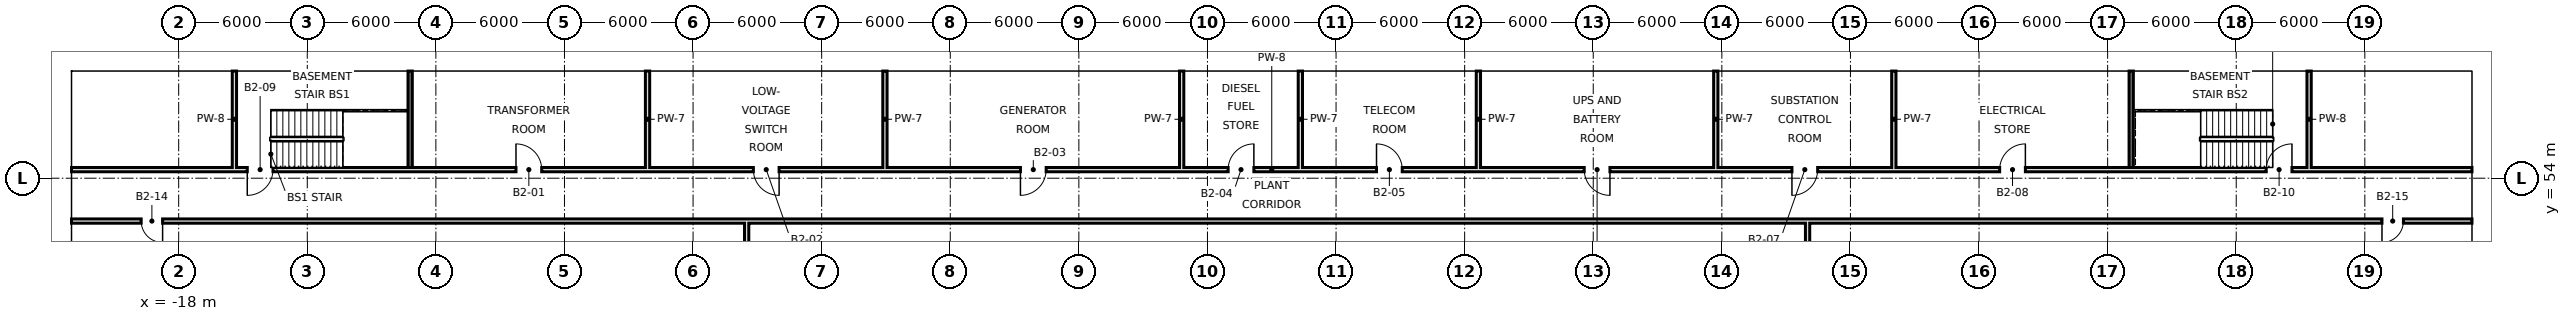
"""IFC4 building model, lengths in metres.
Left out: names, types, materials, properties, quantities, classifications, styles, units other than length and angle.
Written with IfcOpenShell. Run it as: python <this file> out.ifc"""

import sys

from ifc_helpers import new_model, si_unit, direction, frame, frame_2d, origin, place, context, subcontext, project, spatial, rectangle, extrude, element, fill, save


model = new_model("IFC4")
c1 = context("Model", 3, precision=1e-05, world=origin(), true_north=direction((0.0, 1.0)))
c2 = subcontext(c1, "Body", "Model", "MODEL_VIEW")
j1 = project(units=[si_unit("LENGTHUNIT", "METRE"), si_unit("PLANEANGLEUNIT", "RADIAN")], contexts=[c1])
p1 = place(None, origin())
s1 = spatial("IfcSite", under=j1, at=p1, CompositionType="ELEMENT")
p2 = place(p1, origin())
s2 = spatial("IfcBuilding", under=s1, at=p2, CompositionType="ELEMENT")
p3 = place(p2, frame((0.0, 0.0, -13.5)))
s3 = spatial("IfcBuildingStorey", under=s2, at=p3, CompositionType="ELEMENT", Elevation=-13.5)
for number, where, z_axis, x_axis in (
    (1, (-23.5, -12.0, -26.5), (0.0, 0.0, 1.0), (0.0, 1.0, 0.0)),
    (2, (89.5, -12.0, -26.5), (0.0, 0.0, 1.0), (0.0, 1.0, 0.0)),
):
    element("IfcWall", number, at=place(p3, frame(where, z_axis=z_axis, x_axis=x_axis)), inside=s3, PredefinedType="SOLIDWALL", context=c2, shape_type="SweptSolid", body=[
        extrude(rectangle(XDim=72.0, YDim=1.0, at=frame_2d((36.0, 0.0))), origin(), (0.0, 0.0, 1.0), 39.64),
    ])
p4 = place(p3, frame((-23.0, 59.5, -26.5), z_axis=(0.0, 0.0, 1.0), x_axis=(1.0, 0.0, 0.0)))
e3 = element("IfcWall", 3, at=p4, inside=s3, PredefinedType="SOLIDWALL", context=c2, shape_type="SweptSolid", body=[
    extrude(rectangle(XDim=112.0, YDim=1.0, at=frame_2d((56.0, 0.0))), origin(), (0.0, 0.0, 1.0), 39.64),
])
p5 = place(p2, frame((0.0, 0.0, -9.0)))
s4 = spatial("IfcBuildingStorey", under=s2, at=p5, CompositionType="ELEMENT", Elevation=-9.0)
for number, where, z_axis, x_axis in (
    (4, (-15.4, 54.5, 0.0), (0.0, 0.0, 1.0), (0.0, 1.0, 0.0)),
    (5, (-7.2, 54.5, 0.0), (0.0, 0.0, 1.0), (0.0, 1.0, 0.0)),
    (6, (3.876, 54.5, 0.0), (0.0, 0.0, 1.0), (0.0, 1.0, 0.0)),
):
    element("IfcWall", number, at=place(p5, frame(where, z_axis=z_axis, x_axis=x_axis)), inside=s4, PredefinedType="SOLIDWALL", context=c2, shape_type="SweptSolid", body=[
        extrude(rectangle(XDim=4.5, YDim=0.2, at=frame_2d((2.25, 0.0))), origin(), (0.0, 0.0, 1.0), 4.14),
    ])
p6 = place(p5, frame((8.5, 49.6, 0.0), z_axis=(0.0, 0.0, 1.0), x_axis=(0.0, 1.0, 0.0)))
e7 = element("IfcWall", 7, at=p6, inside=s4, PredefinedType="SOLIDWALL", context=c2, shape_type="SweptSolid", body=[
    extrude(rectangle(XDim=2.3, YDim=0.2, at=frame_2d((1.15, 0.0))), origin(), (0.0, 0.0, 1.0), 4.14),
])
for number, where, z_axis, x_axis in (
    (8, (14.952, 54.5, 0.0), (0.0, 0.0, 1.0), (0.0, 1.0, 0.0)),
    (9, (28.797, 54.5, 0.0), (0.0, 0.0, 1.0), (0.0, 1.0, 0.0)),
    (10, (34.334, 54.5, 0.0), (0.0, 0.0, 1.0), (0.0, 1.0, 0.0)),
    (11, (42.641, 54.5, 0.0), (0.0, 0.0, 1.0), (0.0, 1.0, 0.0)),
    (12, (53.717, 54.5, 0.0), (0.0, 0.0, 1.0), (0.0, 1.0, 0.0)),
):
    element("IfcWall", number, at=place(p5, frame(where, z_axis=z_axis, x_axis=x_axis)), inside=s4, PredefinedType="SOLIDWALL", context=c2, shape_type="SweptSolid", body=[
        extrude(rectangle(XDim=4.5, YDim=0.2, at=frame_2d((2.25, 0.0))), origin(), (0.0, 0.0, 1.0), 4.14),
    ])
p7 = place(p5, frame((58.0, -11.0, 0.0), z_axis=(0.0, 0.0, 1.0), x_axis=(0.0, 1.0, 0.0)))
e13 = element("IfcWall", 13, at=p7, inside=s4, PredefinedType="SOLIDWALL", context=c2, shape_type="SweptSolid", body=[
    extrude(rectangle(XDim=62.9, YDim=0.2, at=frame_2d((31.45, 0.0))), origin(), (0.0, 0.0, 1.0), 3.04),
])
p8 = place(p7, frame((0.25, 0.0, 0.0)))
e14 = element("IfcOpeningElement", 14, at=p8, cuts=e13, PredefinedType="OPENING", context=c2, shape_type="SweptSolid", body=[
    extrude(rectangle(XDim=5.3, YDim=2.4, at=frame_2d((2.65, 1.2))), frame((0.0, 0.11, 0.0), z_axis=(0.0, -1.0, 0.0), x_axis=(1.0, 0.0, 0.0)), (0.0, 0.0, 1.0), 0.22),
])
p9 = place(p7, frame((14.25, 0.0, 0.0)))
e15 = element("IfcOpeningElement", 15, at=p9, cuts=e13, PredefinedType="OPENING", context=c2, shape_type="SweptSolid", body=[
    extrude(rectangle(XDim=5.5, YDim=2.4, at=frame_2d((2.75, 1.2))), frame((0.0, 0.11, 0.0), z_axis=(0.0, -1.0, 0.0), x_axis=(1.0, 0.0, 0.0)), (0.0, 0.0, 1.0), 0.22),
])
p10 = place(p7, frame((38.25, 0.0, 0.0)))
e16 = element("IfcOpeningElement", 16, at=p10, cuts=e13, PredefinedType="OPENING", context=c2, shape_type="SweptSolid", body=[
    extrude(rectangle(XDim=5.5, YDim=2.4, at=frame_2d((2.75, 1.2))), frame((0.0, 0.11, 0.0), z_axis=(0.0, -1.0, 0.0), x_axis=(1.0, 0.0, 0.0)), (0.0, 0.0, 1.0), 0.22),
])
p11 = place(p7, frame((50.25, 0.0, 0.0)))
e17 = element("IfcOpeningElement", 17, at=p11, cuts=e13, PredefinedType="OPENING", context=c2, shape_type="SweptSolid", body=[
    extrude(rectangle(XDim=5.5, YDim=2.4, at=frame_2d((2.75, 1.2))), frame((0.0, 0.11, 0.0), z_axis=(0.0, -1.0, 0.0), x_axis=(1.0, 0.0, 0.0)), (0.0, 0.0, 1.0), 0.22),
])
for number, where, z_axis, x_axis in (
    (18, (62.024, 54.5, 0.0), (0.0, 0.0, 1.0), (0.0, 1.0, 0.0)),
    (19, (73.1, 54.5, 0.0), (0.0, 0.0, 1.0), (0.0, 1.0, 0.0)),
    (20, (81.4, 54.5, 0.0), (0.0, 0.0, 1.0), (0.0, 1.0, 0.0)),
):
    element("IfcWall", number, at=place(p5, frame(where, z_axis=z_axis, x_axis=x_axis)), inside=s4, PredefinedType="SOLIDWALL", context=c2, shape_type="SweptSolid", body=[
        extrude(rectangle(XDim=4.5, YDim=0.2, at=frame_2d((2.25, 0.0))), origin(), (0.0, 0.0, 1.0), 4.14),
    ])
p12 = place(p5, frame((-23.0, 52.0, 0.0), z_axis=(0.0, 0.0, 1.0), x_axis=(1.0, 0.0, 0.0)))
e21 = element("IfcWall", 21, at=p12, inside=s4, PredefinedType="SOLIDWALL", context=c2, shape_type="SweptSolid", body=[
    extrude(rectangle(XDim=112.0, YDim=0.2, at=frame_2d((56.0, 0.0))), origin(), (0.0, 0.0, 1.0), 4.14),
])
p13 = place(p12, frame((3.25, 0.0, 0.0)))
e22 = element("IfcOpeningElement", 22, at=p13, cuts=e21, PredefinedType="OPENING", context=c2, shape_type="SweptSolid", body=[
    extrude(rectangle(XDim=1.0, YDim=2.4, at=frame_2d((0.5, 1.2))), frame((0.0, 0.11, 0.0), z_axis=(0.0, -1.0, 0.0), x_axis=(1.0, 0.0, 0.0)), (0.0, 0.0, 1.0), 0.22),
])
p14 = place(p12, frame((107.8, 0.0, 0.0)))
e23 = element("IfcOpeningElement", 23, at=p14, cuts=e21, PredefinedType="OPENING", context=c2, shape_type="SweptSolid", body=[
    extrude(rectangle(XDim=1.0, YDim=2.4, at=frame_2d((0.5, 1.2))), frame((0.0, 0.11, 0.0), z_axis=(0.0, -1.0, 0.0), x_axis=(1.0, 0.0, 0.0)), (0.0, 0.0, 1.0), 0.22),
])
p15 = place(p5, frame((-23.0, 54.4, 0.0), z_axis=(0.0, 0.0, 1.0), x_axis=(1.0, 0.0, 0.0)))
e24 = element("IfcWall", 24, at=p15, inside=s4, PredefinedType="SOLIDWALL", context=c2, shape_type="SweptSolid", body=[
    extrude(rectangle(XDim=112.0, YDim=0.2, at=frame_2d((56.0, 0.0))), origin(), (0.0, 0.0, 1.0), 4.14),
])
p16 = place(p15, frame((20.738, 0.0, 0.0)))
e25 = element("IfcOpeningElement", 25, at=p16, cuts=e24, PredefinedType="OPENING", context=c2, shape_type="SweptSolid", body=[
    extrude(rectangle(XDim=1.2, YDim=2.4, at=frame_2d((0.6, 1.2))), frame((0.0, 0.11, 0.0), z_axis=(0.0, -1.0, 0.0), x_axis=(1.0, 0.0, 0.0)), (0.0, 0.0, 1.0), 0.22),
])
p17 = place(p15, frame((31.814, 0.0, 0.0)))
e26 = element("IfcOpeningElement", 26, at=p17, cuts=e24, PredefinedType="OPENING", context=c2, shape_type="SweptSolid", body=[
    extrude(rectangle(XDim=1.2, YDim=2.4, at=frame_2d((0.6, 1.2))), frame((0.0, 0.11, 0.0), z_axis=(0.0, -1.0, 0.0), x_axis=(1.0, 0.0, 0.0)), (0.0, 0.0, 1.0), 0.22),
])
p18 = place(p15, frame((44.274, 0.0, 0.0)))
e27 = element("IfcOpeningElement", 27, at=p18, cuts=e24, PredefinedType="OPENING", context=c2, shape_type="SweptSolid", body=[
    extrude(rectangle(XDim=1.2, YDim=2.4, at=frame_2d((0.6, 1.2))), frame((0.0, 0.11, 0.0), z_axis=(0.0, -1.0, 0.0), x_axis=(1.0, 0.0, 0.0)), (0.0, 0.0, 1.0), 0.22),
])
p19 = place(p15, frame((53.966, 0.0, 0.0)))
e28 = element("IfcOpeningElement", 28, at=p19, cuts=e24, PredefinedType="OPENING", context=c2, shape_type="SweptSolid", body=[
    extrude(rectangle(XDim=1.2, YDim=2.4, at=frame_2d((0.6, 1.2))), frame((0.0, 0.11, 0.0), z_axis=(0.0, -1.0, 0.0), x_axis=(1.0, 0.0, 0.0)), (0.0, 0.0, 1.0), 0.22),
])
p20 = place(p15, frame((60.888, 0.0, 0.0)))
e29 = element("IfcOpeningElement", 29, at=p20, cuts=e24, PredefinedType="OPENING", context=c2, shape_type="SweptSolid", body=[
    extrude(rectangle(XDim=1.2, YDim=2.4, at=frame_2d((0.6, 1.2))), frame((0.0, 0.11, 0.0), z_axis=(0.0, -1.0, 0.0), x_axis=(1.0, 0.0, 0.0)), (0.0, 0.0, 1.0), 0.22),
])
p21 = place(p15, frame((70.579, 0.0, 0.0)))
e30 = element("IfcOpeningElement", 30, at=p21, cuts=e24, PredefinedType="OPENING", context=c2, shape_type="SweptSolid", body=[
    extrude(rectangle(XDim=1.2, YDim=2.4, at=frame_2d((0.6, 1.2))), frame((0.0, 0.11, 0.0), z_axis=(0.0, -1.0, 0.0), x_axis=(1.0, 0.0, 0.0)), (0.0, 0.0, 1.0), 0.22),
])
p22 = place(p15, frame((80.271, 0.0, 0.0)))
e31 = element("IfcOpeningElement", 31, at=p22, cuts=e24, PredefinedType="OPENING", context=c2, shape_type="SweptSolid", body=[
    extrude(rectangle(XDim=1.2, YDim=2.4, at=frame_2d((0.6, 1.2))), frame((0.0, 0.11, 0.0), z_axis=(0.0, -1.0, 0.0), x_axis=(1.0, 0.0, 0.0)), (0.0, 0.0, 1.0), 0.22),
])
p23 = place(p15, frame((89.962, 0.0, 0.0)))
e32 = element("IfcOpeningElement", 32, at=p23, cuts=e24, PredefinedType="OPENING", context=c2, shape_type="SweptSolid", body=[
    extrude(rectangle(XDim=1.2, YDim=2.4, at=frame_2d((0.6, 1.2))), frame((0.0, 0.11, 0.0), z_axis=(0.0, -1.0, 0.0), x_axis=(1.0, 0.0, 0.0)), (0.0, 0.0, 1.0), 0.22),
])
p24 = place(p15, frame((8.2, 0.0, 0.0)))
e33 = element("IfcOpeningElement", 33, at=p24, cuts=e24, PredefinedType="OPENING", context=c2, shape_type="SweptSolid", body=[
    extrude(rectangle(XDim=1.2, YDim=2.4, at=frame_2d((0.6, 1.2))), frame((0.0, 0.11, 0.0), z_axis=(0.0, -1.0, 0.0), x_axis=(1.0, 0.0, 0.0)), (0.0, 0.0, 1.0), 0.22),
])
p25 = place(p15, frame((102.4, 0.0, 0.0)))
e34 = element("IfcOpeningElement", 34, at=p25, cuts=e24, PredefinedType="OPENING", context=c2, shape_type="SweptSolid", body=[
    extrude(rectangle(XDim=1.2, YDim=2.4, at=frame_2d((0.6, 1.2))), frame((0.0, 0.11, 0.0), z_axis=(0.0, -1.0, 0.0), x_axis=(1.0, 0.0, 0.0)), (0.0, 0.0, 1.0), 0.22),
])
p26 = place(p16, origin())
e35 = element("IfcDoor", 35, at=p26, inside=s4, OperationType="SINGLE_SWING_LEFT", PredefinedType="DOOR", context=c2, shape_type="SweptSolid", body=[
    extrude(rectangle(XDim=1.2, YDim=2.4, at=frame_2d((0.6, 1.2))), frame((0.0, 0.025, 0.0), z_axis=(0.0, -1.0, 0.0), x_axis=(1.0, 0.0, 0.0)), (0.0, 0.0, 1.0), 0.05),
])
fill(e25, e35)
p27 = place(p17, origin())
e36 = element("IfcDoor", 36, at=p27, inside=s4, OperationType="SINGLE_SWING_RIGHT", PredefinedType="DOOR", context=c2, shape_type="SweptSolid", body=[
    extrude(rectangle(XDim=1.2, YDim=2.4, at=frame_2d((0.6, 1.2))), frame((0.0, 0.025, 0.0), z_axis=(0.0, -1.0, 0.0), x_axis=(1.0, 0.0, 0.0)), (0.0, 0.0, 1.0), 0.05),
])
fill(e26, e36)
p28 = place(p18, frame((1.2, 0.0, 0.0), z_axis=(0.0, 0.0, 1.0), x_axis=(-1.0, 0.0, 0.0)))
e37 = element("IfcDoor", 37, at=p28, inside=s4, OperationType="SINGLE_SWING_RIGHT", PredefinedType="DOOR", context=c2, shape_type="SweptSolid", body=[
    extrude(rectangle(XDim=1.2, YDim=2.4, at=frame_2d((0.6, 1.2))), frame((0.0, 0.025, 0.0), z_axis=(0.0, -1.0, 0.0), x_axis=(1.0, 0.0, 0.0)), (0.0, 0.0, 1.0), 0.05),
])
fill(e27, e37)
p29 = place(p19, frame((1.2, 0.0, 0.0), z_axis=(0.0, 0.0, 1.0), x_axis=(-1.0, 0.0, 0.0)))
e38 = element("IfcDoor", 38, at=p29, inside=s4, OperationType="SINGLE_SWING_LEFT", PredefinedType="DOOR", context=c2, shape_type="SweptSolid", body=[
    extrude(rectangle(XDim=1.2, YDim=2.4, at=frame_2d((0.6, 1.2))), frame((0.0, 0.025, 0.0), z_axis=(0.0, -1.0, 0.0), x_axis=(1.0, 0.0, 0.0)), (0.0, 0.0, 1.0), 0.05),
])
fill(e28, e38)
p30 = place(p20, origin())
e39 = element("IfcDoor", 39, at=p30, inside=s4, OperationType="SINGLE_SWING_LEFT", PredefinedType="DOOR", context=c2, shape_type="SweptSolid", body=[
    extrude(rectangle(XDim=1.2, YDim=2.4, at=frame_2d((0.6, 1.2))), frame((0.0, 0.025, 0.0), z_axis=(0.0, -1.0, 0.0), x_axis=(1.0, 0.0, 0.0)), (0.0, 0.0, 1.0), 0.05),
])
fill(e29, e39)
p31 = place(p21, origin())
e40 = element("IfcDoor", 40, at=p31, inside=s4, OperationType="SINGLE_SWING_RIGHT", PredefinedType="DOOR", context=c2, shape_type="SweptSolid", body=[
    extrude(rectangle(XDim=1.2, YDim=2.4, at=frame_2d((0.6, 1.2))), frame((0.0, 0.025, 0.0), z_axis=(0.0, -1.0, 0.0), x_axis=(1.0, 0.0, 0.0)), (0.0, 0.0, 1.0), 0.05),
])
fill(e30, e40)
p32 = place(p22, frame((1.2, 0.0, 0.0), z_axis=(0.0, 0.0, 1.0), x_axis=(-1.0, 0.0, 0.0)))
e41 = element("IfcDoor", 41, at=p32, inside=s4, OperationType="SINGLE_SWING_RIGHT", PredefinedType="DOOR", context=c2, shape_type="SweptSolid", body=[
    extrude(rectangle(XDim=1.2, YDim=2.4, at=frame_2d((0.6, 1.2))), frame((0.0, 0.025, 0.0), z_axis=(0.0, -1.0, 0.0), x_axis=(1.0, 0.0, 0.0)), (0.0, 0.0, 1.0), 0.05),
])
fill(e31, e41)
p33 = place(p23, frame((1.2, 0.0, 0.0), z_axis=(0.0, 0.0, 1.0), x_axis=(-1.0, 0.0, 0.0)))
e42 = element("IfcDoor", 42, at=p33, inside=s4, OperationType="SINGLE_SWING_LEFT", PredefinedType="DOOR", context=c2, shape_type="SweptSolid", body=[
    extrude(rectangle(XDim=1.2, YDim=2.4, at=frame_2d((0.6, 1.2))), frame((0.0, 0.025, 0.0), z_axis=(0.0, -1.0, 0.0), x_axis=(1.0, 0.0, 0.0)), (0.0, 0.0, 1.0), 0.05),
])
fill(e32, e42)
p34 = place(p24, frame((1.2, 0.0, 0.0), z_axis=(0.0, 0.0, 1.0), x_axis=(-1.0, 0.0, 0.0)))
e43 = element("IfcDoor", 43, at=p34, inside=s4, OperationType="SINGLE_SWING_RIGHT", PredefinedType="DOOR", context=c2, shape_type="SweptSolid", body=[
    extrude(rectangle(XDim=1.2, YDim=2.4, at=frame_2d((0.6, 1.2))), frame((0.0, 0.025, 0.0), z_axis=(0.0, -1.0, 0.0), x_axis=(1.0, 0.0, 0.0)), (0.0, 0.0, 1.0), 0.05),
])
fill(e33, e43)
p35 = place(p25, frame((1.2, 0.0, 0.0), z_axis=(0.0, 0.0, 1.0), x_axis=(-1.0, 0.0, 0.0)))
e44 = element("IfcDoor", 44, at=p35, inside=s4, OperationType="SINGLE_SWING_LEFT", PredefinedType="DOOR", context=c2, shape_type="SweptSolid", body=[
    extrude(rectangle(XDim=1.2, YDim=2.4, at=frame_2d((0.6, 1.2))), frame((0.0, 0.025, 0.0), z_axis=(0.0, -1.0, 0.0), x_axis=(1.0, 0.0, 0.0)), (0.0, 0.0, 1.0), 0.05),
])
fill(e34, e44)
p36 = place(p13, origin())
e45 = element("IfcDoor", 45, at=p36, inside=s4, OperationType="SINGLE_SWING_RIGHT", PredefinedType="DOOR", context=c2, shape_type="SweptSolid", body=[
    extrude(rectangle(XDim=1.0, YDim=2.4, at=frame_2d((0.5, 1.2))), frame((0.0, 0.025, 0.0), z_axis=(0.0, -1.0, 0.0), x_axis=(1.0, 0.0, 0.0)), (0.0, 0.0, 1.0), 0.05),
])
fill(e22, e45)
p37 = place(p14, frame((1.0, 0.0, 0.0), z_axis=(0.0, 0.0, 1.0), x_axis=(-1.0, 0.0, 0.0)))
e46 = element("IfcDoor", 46, at=p37, inside=s4, OperationType="SINGLE_SWING_RIGHT", PredefinedType="DOOR", context=c2, shape_type="SweptSolid", body=[
    extrude(rectangle(XDim=1.0, YDim=2.4, at=frame_2d((0.5, 1.2))), frame((0.0, 0.025, 0.0), z_axis=(0.0, -1.0, 0.0), x_axis=(1.0, 0.0, 0.0)), (0.0, 0.0, 1.0), 0.05),
])
fill(e23, e46)
save(model, sys.argv[1])
